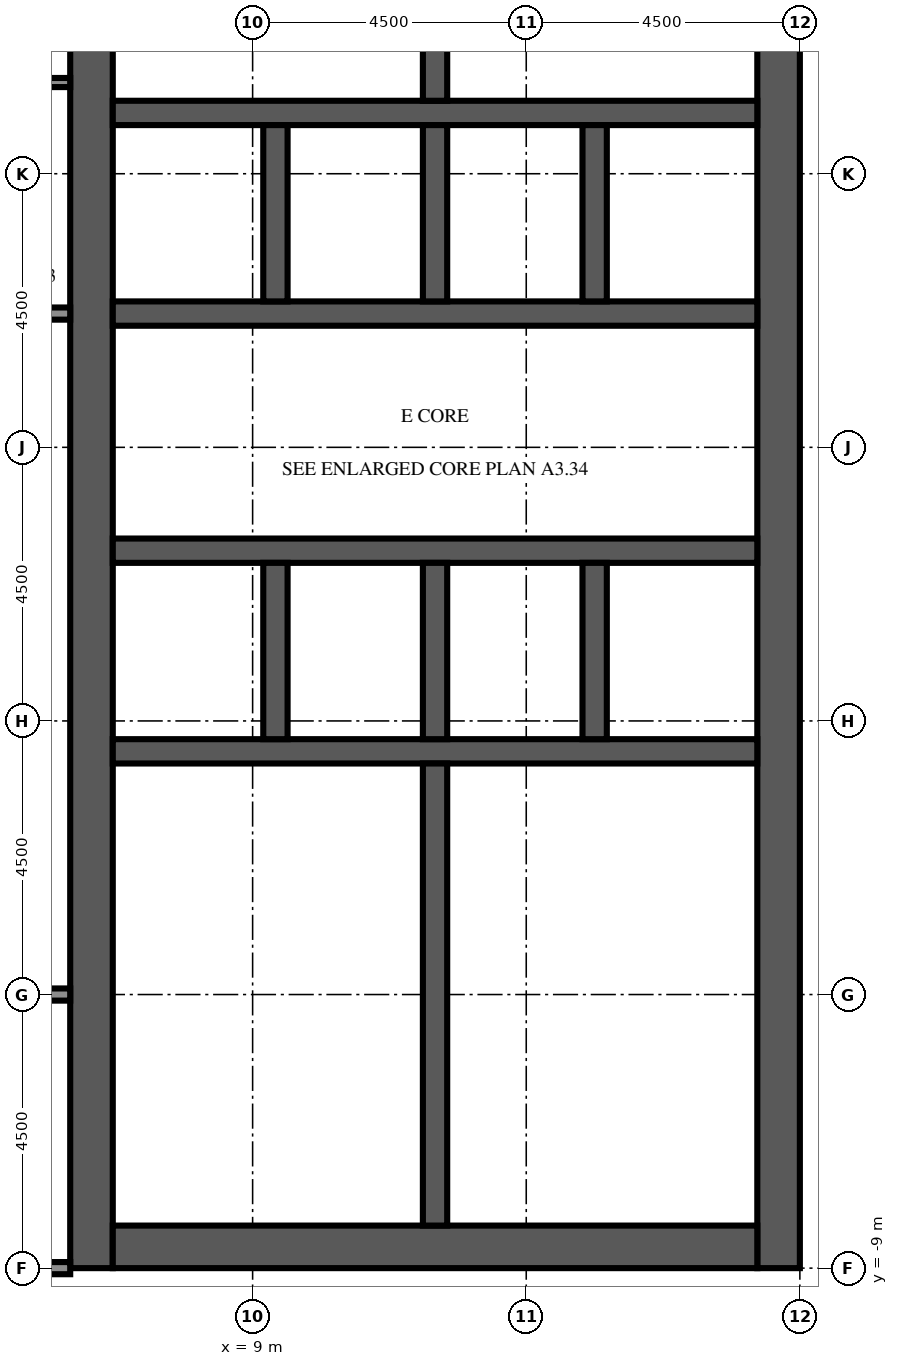
"""IFC4 building model, lengths in metres.
Left out: names, types, materials, properties, quantities, classifications, styles, units other than length and angle.
Written with IfcOpenShell. Run it as: python <this file> out.ifc"""

import sys

from ifc_helpers import new_model, si_unit, direction, frame, frame_2d, origin, place, context, subcontext, project, spatial, rectangle, extrude, element, fill, save


model = new_model("IFC4")
c1 = context("Model", 3, precision=1e-05, world=origin(), true_north=direction((0.0, 1.0)))
c2 = subcontext(c1, "Body", "Model", "MODEL_VIEW")
j1 = project(units=[si_unit("LENGTHUNIT", "METRE"), si_unit("PLANEANGLEUNIT", "RADIAN")], contexts=[c1])
p1 = place(None, origin())
s1 = spatial("IfcSite", under=j1, at=p1, CompositionType="ELEMENT")
p2 = place(p1, origin())
s2 = spatial("IfcBuilding", under=s1, at=p2, CompositionType="ELEMENT")
p3 = place(p2, frame((0.0, 0.0, 226.2)))
s3 = spatial("IfcBuildingStorey", under=s2, at=p3, CompositionType="ELEMENT", Elevation=226.2)
p4 = place(p3, frame((6.35, -9.0, 0.0), z_axis=(0.0, 0.0, 1.0), x_axis=(0.0, 1.0, 0.0)))
e1 = element("IfcWall", 1, at=p4, inside=s3, PredefinedType="SHEAR", context=c2, shape_type="SweptSolid", body=[
    extrude(rectangle(XDim=27.5, YDim=0.7, at=frame_2d((13.75, 0.0))), origin(), (0.0, 0.0, 1.0), 5.4),
])
p5 = place(p4, frame((12.55, 0.0, 0.0)))
e2 = element("IfcOpeningElement", 2, at=p5, cuts=e1, PredefinedType="OPENING", context=c2, shape_type="SweptSolid", body=[
    extrude(rectangle(XDim=2.4, YDim=2.4, at=frame_2d((1.2, 1.2))), frame((0.0, 0.36, 0.0), z_axis=(0.0, -1.0, 0.0), x_axis=(1.0, 0.0, 0.0)), (0.0, 0.0, 1.0), 0.72),
])
p6 = place(p4, frame((5.46, 0.0, 0.0)))
e3 = element("IfcOpeningElement", 3, at=p6, cuts=e1, PredefinedType="OPENING", context=c2, shape_type="SweptSolid", body=[
    extrude(rectangle(XDim=0.968, YDim=2.1, at=frame_2d((0.484, 1.05))), frame((0.0, 0.36, 0.0), z_axis=(0.0, -1.0, 0.0), x_axis=(1.0, 0.0, 0.0)), (0.0, 0.0, 1.0), 0.72),
])
p7 = place(p4, frame((23.54, 0.0, 0.0)))
e4 = element("IfcOpeningElement", 4, at=p7, cuts=e1, PredefinedType="OPENING", context=c2, shape_type="SweptSolid", body=[
    extrude(rectangle(XDim=1.2, YDim=2.1, at=frame_2d((0.6, 1.05))), frame((0.0, 0.36, 0.0), z_axis=(0.0, -1.0, 0.0), x_axis=(1.0, 0.0, 0.0)), (0.0, 0.0, 1.0), 0.72),
])
p8 = place(p3, frame((17.65, -9.0, 0.0), z_axis=(0.0, 0.0, 1.0), x_axis=(0.0, 1.0, 0.0)))
e5 = element("IfcWall", 5, at=p8, inside=s3, PredefinedType="SHEAR", context=c2, shape_type="SweptSolid", body=[
    extrude(rectangle(XDim=27.5, YDim=0.7, at=frame_2d((13.75, 0.0))), origin(), (0.0, 0.0, 1.0), 5.4),
])
p9 = place(p8, frame((12.55, 0.0, 0.0)))
e6 = element("IfcOpeningElement", 6, at=p9, cuts=e5, PredefinedType="OPENING", context=c2, shape_type="SweptSolid", body=[
    extrude(rectangle(XDim=2.4, YDim=2.4, at=frame_2d((1.2, 1.2))), frame((0.0, 0.36, 0.0), z_axis=(0.0, -1.0, 0.0), x_axis=(1.0, 0.0, 0.0)), (0.0, 0.0, 1.0), 0.72),
])
p10 = place(p8, frame((6.825, 0.0, 0.0)))
e7 = element("IfcOpeningElement", 7, at=p10, cuts=e5, PredefinedType="OPENING", context=c2, shape_type="SweptSolid", body=[
    extrude(rectangle(XDim=1.2, YDim=2.1, at=frame_2d((0.6, 1.05))), frame((0.0, 0.36, 0.0), z_axis=(0.0, -1.0, 0.0), x_axis=(1.0, 0.0, 0.0)), (0.0, 0.0, 1.0), 0.72),
])
p11 = place(p8, frame((19.475, 0.0, 0.0)))
e8 = element("IfcOpeningElement", 8, at=p11, cuts=e5, PredefinedType="OPENING", context=c2, shape_type="SweptSolid", body=[
    extrude(rectangle(XDim=1.2, YDim=2.1, at=frame_2d((0.6, 1.05))), frame((0.0, 0.36, 0.0), z_axis=(0.0, -1.0, 0.0), x_axis=(1.0, 0.0, 0.0)), (0.0, 0.0, 1.0), 0.72),
])
p12 = place(p3, frame((6.7, -8.65, 0.0), z_axis=(0.0, 0.0, 1.0), x_axis=(1.0, 0.0, 0.0)))
e9 = element("IfcWall", 9, at=p12, inside=s3, PredefinedType="SHEAR", context=c2, shape_type="SweptSolid", body=[
    extrude(rectangle(XDim=10.6, YDim=0.7, at=frame_2d((5.3, 0.0))), origin(), (0.0, 0.0, 1.0), 5.4),
])
p13 = place(p3, frame((6.7, -0.5, 0.0), z_axis=(0.0, 0.0, 1.0), x_axis=(1.0, 0.0, 0.0)))
e10 = element("IfcWall", 10, at=p13, inside=s3, PredefinedType="SHEAR", context=c2, shape_type="SweptSolid", body=[
    extrude(rectangle(XDim=10.6, YDim=0.4, at=frame_2d((5.3, 0.0))), origin(), (0.0, 0.0, 1.0), 5.4),
])
p14 = place(p3, frame((6.7, 2.8, 0.0), z_axis=(0.0, 0.0, 1.0), x_axis=(1.0, 0.0, 0.0)))
e11 = element("IfcWall", 11, at=p14, inside=s3, PredefinedType="SHEAR", context=c2, shape_type="SweptSolid", body=[
    extrude(rectangle(XDim=10.6, YDim=0.4, at=frame_2d((5.3, 0.0))), origin(), (0.0, 0.0, 1.0), 5.4),
])
p15 = place(p14, frame((0.688, 0.0, 0.0)))
e12 = element("IfcOpeningElement", 12, at=p15, cuts=e11, PredefinedType="OPENING", context=c2, shape_type="SweptSolid", body=[
    extrude(rectangle(XDim=1.1, YDim=2.1, at=frame_2d((0.55, 1.05))), frame((0.0, 0.21, 0.0), z_axis=(0.0, -1.0, 0.0), x_axis=(1.0, 0.0, 0.0)), (0.0, 0.0, 1.0), 0.42),
])
p16 = place(p14, frame((3.438, 0.0, 0.0)))
e13 = element("IfcOpeningElement", 13, at=p16, cuts=e11, PredefinedType="OPENING", context=c2, shape_type="SweptSolid", body=[
    extrude(rectangle(XDim=1.1, YDim=2.1, at=frame_2d((0.55, 1.05))), frame((0.0, 0.21, 0.0), z_axis=(0.0, -1.0, 0.0), x_axis=(1.0, 0.0, 0.0)), (0.0, 0.0, 1.0), 0.42),
])
p17 = place(p14, frame((6.113, 0.0, 0.0)))
e14 = element("IfcOpeningElement", 14, at=p17, cuts=e11, PredefinedType="OPENING", context=c2, shape_type="SweptSolid", body=[
    extrude(rectangle(XDim=1.0, YDim=2.1, at=frame_2d((0.5, 1.05))), frame((0.0, 0.21, 0.0), z_axis=(0.0, -1.0, 0.0), x_axis=(1.0, 0.0, 0.0)), (0.0, 0.0, 1.0), 0.42),
])
p18 = place(p14, frame((8.863, 0.0, 0.0)))
e15 = element("IfcOpeningElement", 15, at=p18, cuts=e11, PredefinedType="OPENING", context=c2, shape_type="SweptSolid", body=[
    extrude(rectangle(XDim=1.0, YDim=2.1, at=frame_2d((0.5, 1.05))), frame((0.0, 0.21, 0.0), z_axis=(0.0, -1.0, 0.0), x_axis=(1.0, 0.0, 0.0)), (0.0, 0.0, 1.0), 0.42),
])
p19 = place(p3, frame((6.7, 6.7, 0.0), z_axis=(0.0, 0.0, 1.0), x_axis=(1.0, 0.0, 0.0)))
e16 = element("IfcWall", 16, at=p19, inside=s3, PredefinedType="SHEAR", context=c2, shape_type="SweptSolid", body=[
    extrude(rectangle(XDim=10.6, YDim=0.4, at=frame_2d((5.3, 0.0))), origin(), (0.0, 0.0, 1.0), 5.4),
])
p20 = place(p19, frame((3.438, 0.0, 0.0)))
e17 = element("IfcOpeningElement", 17, at=p20, cuts=e16, PredefinedType="OPENING", context=c2, shape_type="SweptSolid", body=[
    extrude(rectangle(XDim=1.1, YDim=2.1, at=frame_2d((0.55, 1.05))), frame((0.0, 0.21, 0.0), z_axis=(0.0, -1.0, 0.0), x_axis=(1.0, 0.0, 0.0)), (0.0, 0.0, 1.0), 0.42),
])
p21 = place(p19, frame((6.062, 0.0, 0.0)))
e18 = element("IfcOpeningElement", 18, at=p21, cuts=e16, PredefinedType="OPENING", context=c2, shape_type="SweptSolid", body=[
    extrude(rectangle(XDim=1.1, YDim=2.1, at=frame_2d((0.55, 1.05))), frame((0.0, 0.21, 0.0), z_axis=(0.0, -1.0, 0.0), x_axis=(1.0, 0.0, 0.0)), (0.0, 0.0, 1.0), 0.42),
])
p22 = place(p19, frame((8.812, 0.0, 0.0)))
e19 = element("IfcOpeningElement", 19, at=p22, cuts=e16, PredefinedType="OPENING", context=c2, shape_type="SweptSolid", body=[
    extrude(rectangle(XDim=1.1, YDim=2.1, at=frame_2d((0.55, 1.05))), frame((0.0, 0.21, 0.0), z_axis=(0.0, -1.0, 0.0), x_axis=(1.0, 0.0, 0.0)), (0.0, 0.0, 1.0), 0.42),
])
p23 = place(p19, frame((0.738, 0.0, 0.0)))
e20 = element("IfcOpeningElement", 20, at=p23, cuts=e16, PredefinedType="OPENING", context=c2, shape_type="SweptSolid", body=[
    extrude(rectangle(XDim=1.0, YDim=2.1, at=frame_2d((0.5, 1.05))), frame((0.0, 0.21, 0.0), z_axis=(0.0, -1.0, 0.0), x_axis=(1.0, 0.0, 0.0)), (0.0, 0.0, 1.0), 0.42),
])
p24 = place(p3, frame((6.7, 10.0, 0.0), z_axis=(0.0, 0.0, 1.0), x_axis=(1.0, 0.0, 0.0)))
e21 = element("IfcWall", 21, at=p24, inside=s3, PredefinedType="SHEAR", context=c2, shape_type="SweptSolid", body=[
    extrude(rectangle(XDim=10.6, YDim=0.4, at=frame_2d((5.3, 0.0))), origin(), (0.0, 0.0, 1.0), 5.4),
])
for number, where, z_axis, x_axis in (
    (22, (9.375, -0.3, 0.0), (0.0, 0.0, 1.0), (0.0, 1.0, 0.0)),
    (23, (9.375, 6.9, 0.0), (0.0, 0.0, 1.0), (0.0, 1.0, 0.0)),
    (24, (12.0, -0.3, 0.0), (0.0, 0.0, 1.0), (0.0, 1.0, 0.0)),
    (25, (12.0, 6.9, 0.0), (0.0, 0.0, 1.0), (0.0, 1.0, 0.0)),
    (26, (14.625, -0.3, 0.0), (0.0, 0.0, 1.0), (0.0, 1.0, 0.0)),
    (27, (14.625, 6.9, 0.0), (0.0, 0.0, 1.0), (0.0, 1.0, 0.0)),
):
    element("IfcWall", number, at=place(p3, frame(where, z_axis=z_axis, x_axis=x_axis)), inside=s3, PredefinedType="SHEAR", context=c2, shape_type="SweptSolid", body=[
        extrude(rectangle(XDim=2.9, YDim=0.4, at=frame_2d((1.45, 0.0))), origin(), (0.0, 0.0, 1.0), 5.4),
    ])
for number, where, z_axis, x_axis in (
    (28, (12.0, -8.3, 0.0), (0.0, 0.0, 1.0), (0.0, 1.0, 0.0)),
    (29, (12.0, 10.2, 0.0), (0.0, 0.0, 1.0), (0.0, 1.0, 0.0)),
):
    element("IfcWall", number, at=place(p3, frame(where, z_axis=z_axis, x_axis=x_axis)), inside=s3, PredefinedType="SHEAR", context=c2, shape_type="SweptSolid", body=[
        extrude(rectangle(XDim=7.6, YDim=0.4, at=frame_2d((3.8, 0.0))), origin(), (0.0, 0.0, 1.0), 5.4),
    ])
p25 = place(p3, frame((6.7, -3.74, 0.0), z_axis=(0.0, 0.0, 1.0), x_axis=(1.0, 0.0, 0.0)))
e30 = element("IfcWall", 30, at=p25, inside=s3, PredefinedType="PARTITIONING", context=c2, shape_type="SweptSolid", body=[
    extrude(rectangle(XDim=2.55, YDim=0.1, at=frame_2d((1.275, 0.0))), origin(), (0.0, 0.0, 1.0), 4.95),
])
p26 = place(p25, frame((0.775, 0.0, 0.0)))
e31 = element("IfcOpeningElement", 31, at=p26, cuts=e30, PredefinedType="OPENING", context=c2, shape_type="SweptSolid", body=[
    extrude(rectangle(XDim=1.0, YDim=2.1, at=frame_2d((0.5, 1.05))), frame((0.0, 0.06, 0.0), z_axis=(0.0, -1.0, 0.0), x_axis=(1.0, 0.0, 0.0)), (0.0, 0.0, 1.0), 0.12),
])
p27 = place(p3, frame((9.25, -3.74, 0.0), z_axis=(0.0, 0.0, 1.0), x_axis=(1.0, 0.0, 0.0)))
e32 = element("IfcWall", 32, at=p27, inside=s3, PredefinedType="PARTITIONING", context=c2, shape_type="SweptSolid", body=[
    extrude(rectangle(XDim=2.55, YDim=0.1, at=frame_2d((1.275, 0.0))), origin(), (0.0, 0.0, 1.0), 4.95),
])
p28 = place(p27, frame((0.775, 0.0, 0.0)))
e33 = element("IfcOpeningElement", 33, at=p28, cuts=e32, PredefinedType="OPENING", context=c2, shape_type="SweptSolid", body=[
    extrude(rectangle(XDim=1.0, YDim=2.1, at=frame_2d((0.5, 1.05))), frame((0.0, 0.06, 0.0), z_axis=(0.0, -1.0, 0.0), x_axis=(1.0, 0.0, 0.0)), (0.0, 0.0, 1.0), 0.12),
])
p29 = place(p3, frame((6.7, -2.372, 0.0), z_axis=(0.0, 0.0, 1.0), x_axis=(1.0, 0.0, 0.0)))
e34 = element("IfcWall", 34, at=p29, inside=s3, PredefinedType="PARTITIONING", context=c2, shape_type="SweptSolid", body=[
    extrude(rectangle(XDim=2.55, YDim=0.1, at=frame_2d((1.275, 0.0))), origin(), (0.0, 0.0, 1.0), 4.95),
])
p30 = place(p29, frame((0.775, 0.0, 0.0)))
e35 = element("IfcOpeningElement", 35, at=p30, cuts=e34, PredefinedType="OPENING", context=c2, shape_type="SweptSolid", body=[
    extrude(rectangle(XDim=1.0, YDim=2.1, at=frame_2d((0.5, 1.05))), frame((0.0, 0.06, 0.0), z_axis=(0.0, -1.0, 0.0), x_axis=(1.0, 0.0, 0.0)), (0.0, 0.0, 1.0), 0.12),
])
p31 = place(p3, frame((9.25, -2.372, 0.0), z_axis=(0.0, 0.0, 1.0), x_axis=(1.0, 0.0, 0.0)))
e36 = element("IfcWall", 36, at=p31, inside=s3, PredefinedType="PARTITIONING", context=c2, shape_type="SweptSolid", body=[
    extrude(rectangle(XDim=2.55, YDim=0.1, at=frame_2d((1.275, 0.0))), origin(), (0.0, 0.0, 1.0), 4.95),
])
p32 = place(p31, frame((0.775, 0.0, 0.0)))
e37 = element("IfcOpeningElement", 37, at=p32, cuts=e36, PredefinedType="OPENING", context=c2, shape_type="SweptSolid", body=[
    extrude(rectangle(XDim=1.0, YDim=2.1, at=frame_2d((0.5, 1.05))), frame((0.0, 0.06, 0.0), z_axis=(0.0, -1.0, 0.0), x_axis=(1.0, 0.0, 0.0)), (0.0, 0.0, 1.0), 0.12),
])
p33 = place(p3, frame((9.25, -8.3, 0.0), z_axis=(0.0, 0.0, 1.0), x_axis=(0.0, 1.0, 0.0)))
e38 = element("IfcWall", 38, at=p33, inside=s3, PredefinedType="PARTITIONING", context=c2, shape_type="SweptSolid", body=[
    extrude(rectangle(XDim=4.56, YDim=0.1, at=frame_2d((2.28, 0.0))), origin(), (0.0, 0.0, 1.0), 4.95),
])
p34 = place(p3, frame((9.25, -2.372, 0.0), z_axis=(0.0, 0.0, 1.0), x_axis=(0.0, 1.0, 0.0)))
e39 = element("IfcWall", 39, at=p34, inside=s3, PredefinedType="PARTITIONING", context=c2, shape_type="SweptSolid", body=[
    extrude(rectangle(XDim=1.672, YDim=0.1, at=frame_2d((0.836, 0.0))), origin(), (0.0, 0.0, 1.0), 4.95),
])
p35 = place(p3, frame((1.5, -9.0, 0.0), z_axis=(0.0, 0.0, 1.0), x_axis=(1.0, 0.0, 0.0)))
e40 = element("IfcWall", 40, at=p35, inside=s3, PredefinedType="PARTITIONING", context=c2, shape_type="SweptSolid", body=[
    extrude(rectangle(XDim=4.5, YDim=0.2, at=frame_2d((2.25, 0.0))), origin(), (0.0, 0.0, 1.0), 4.95),
])
p36 = place(p35, frame((2.35, 0.0, 0.0)))
e41 = element("IfcOpeningElement", 41, at=p36, cuts=e40, PredefinedType="OPENING", context=c2, shape_type="SweptSolid", body=[
    extrude(rectangle(XDim=1.0, YDim=2.1, at=frame_2d((0.5, 1.05))), frame((0.0, 0.11, 0.0), z_axis=(0.0, -1.0, 0.0), x_axis=(1.0, 0.0, 0.0)), (0.0, 0.0, 1.0), 0.22),
])
p37 = place(p3, frame((1.5, -4.5, 0.0), z_axis=(0.0, 0.0, 1.0), x_axis=(1.0, 0.0, 0.0)))
e42 = element("IfcWall", 42, at=p37, inside=s3, PredefinedType="PARTITIONING", context=c2, shape_type="SweptSolid", body=[
    extrude(rectangle(XDim=4.5, YDim=0.2, at=frame_2d((2.25, 0.0))), origin(), (0.0, 0.0, 1.0), 4.95),
])
p38 = place(p3, frame((1.5, 6.7, 0.0), z_axis=(0.0, 0.0, 1.0), x_axis=(1.0, 0.0, 0.0)))
e43 = element("IfcWall", 43, at=p38, inside=s3, PredefinedType="PARTITIONING", context=c2, shape_type="SweptSolid", body=[
    extrude(rectangle(XDim=4.5, YDim=0.2, at=frame_2d((2.25, 0.0))), origin(), (0.0, 0.0, 1.0), 4.95),
])
p39 = place(p38, frame((1.35, 0.0, 0.0)))
e44 = element("IfcOpeningElement", 44, at=p39, cuts=e43, PredefinedType="OPENING", context=c2, shape_type="SweptSolid", body=[
    extrude(rectangle(XDim=1.0, YDim=2.1, at=frame_2d((0.5, 1.05))), frame((0.0, 0.11, 0.0), z_axis=(0.0, -1.0, 0.0), x_axis=(1.0, 0.0, 0.0)), (0.0, 0.0, 1.0), 0.22),
])
p40 = place(p3, frame((1.5, 10.5, 0.0), z_axis=(0.0, 0.0, 1.0), x_axis=(1.0, 0.0, 0.0)))
e45 = element("IfcWall", 45, at=p40, inside=s3, PredefinedType="PARTITIONING", context=c2, shape_type="SweptSolid", body=[
    extrude(rectangle(XDim=4.5, YDim=0.15, at=frame_2d((2.25, 0.0))), origin(), (0.0, 0.0, 1.0), 4.95),
])
p41 = place(p40, frame((1.35, 0.0, 0.0)))
e46 = element("IfcOpeningElement", 46, at=p41, cuts=e45, PredefinedType="OPENING", context=c2, shape_type="SweptSolid", body=[
    extrude(rectangle(XDim=1.0, YDim=2.1, at=frame_2d((0.5, 1.05))), frame((0.0, 0.085, 0.0), z_axis=(0.0, -1.0, 0.0), x_axis=(1.0, 0.0, 0.0)), (0.0, 0.0, 1.0), 0.17),
])
p42 = place(p15, origin())
e47 = element("IfcDoor", 47, at=p42, inside=s3, OperationType="DOUBLE_DOOR_SLIDING", PredefinedType="DOOR", context=c2, shape_type="SweptSolid", body=[
    extrude(rectangle(XDim=1.1, YDim=2.1, at=frame_2d((0.55, 1.05))), frame((0.0, 0.025, 0.0), z_axis=(0.0, -1.0, 0.0), x_axis=(1.0, 0.0, 0.0)), (0.0, 0.0, 1.0), 0.05),
])
fill(e12, e47)
p43 = place(p16, origin())
e48 = element("IfcDoor", 48, at=p43, inside=s3, OperationType="DOUBLE_DOOR_SLIDING", PredefinedType="DOOR", context=c2, shape_type="SweptSolid", body=[
    extrude(rectangle(XDim=1.1, YDim=2.1, at=frame_2d((0.55, 1.05))), frame((0.0, 0.025, 0.0), z_axis=(0.0, -1.0, 0.0), x_axis=(1.0, 0.0, 0.0)), (0.0, 0.0, 1.0), 0.05),
])
fill(e13, e48)
p44 = place(p20, origin())
e49 = element("IfcDoor", 49, at=p44, inside=s3, OperationType="DOUBLE_DOOR_SLIDING", PredefinedType="DOOR", context=c2, shape_type="SweptSolid", body=[
    extrude(rectangle(XDim=1.1, YDim=2.1, at=frame_2d((0.55, 1.05))), frame((0.0, 0.025, 0.0), z_axis=(0.0, -1.0, 0.0), x_axis=(1.0, 0.0, 0.0)), (0.0, 0.0, 1.0), 0.05),
])
fill(e17, e49)
p45 = place(p21, origin())
e50 = element("IfcDoor", 50, at=p45, inside=s3, OperationType="DOUBLE_DOOR_SLIDING", PredefinedType="DOOR", context=c2, shape_type="SweptSolid", body=[
    extrude(rectangle(XDim=1.1, YDim=2.1, at=frame_2d((0.55, 1.05))), frame((0.0, 0.025, 0.0), z_axis=(0.0, -1.0, 0.0), x_axis=(1.0, 0.0, 0.0)), (0.0, 0.0, 1.0), 0.05),
])
fill(e18, e50)
p46 = place(p22, origin())
e51 = element("IfcDoor", 51, at=p46, inside=s3, OperationType="DOUBLE_DOOR_SLIDING", PredefinedType="DOOR", context=c2, shape_type="SweptSolid", body=[
    extrude(rectangle(XDim=1.1, YDim=2.1, at=frame_2d((0.55, 1.05))), frame((0.0, 0.025, 0.0), z_axis=(0.0, -1.0, 0.0), x_axis=(1.0, 0.0, 0.0)), (0.0, 0.0, 1.0), 0.05),
])
fill(e19, e51)
p47 = place(p5, origin())
e52 = element("IfcDoor", 52, at=p47, inside=s3, OperationType="DOUBLE_DOOR_DOUBLE_SWING", PredefinedType="DOOR", context=c2, shape_type="SweptSolid", body=[
    extrude(rectangle(XDim=2.4, YDim=2.4, at=frame_2d((1.2, 1.2))), frame((0.0, 0.025, 0.0), z_axis=(0.0, -1.0, 0.0), x_axis=(1.0, 0.0, 0.0)), (0.0, 0.0, 1.0), 0.05),
])
fill(e2, e52)
p48 = place(p9, origin())
e53 = element("IfcDoor", 53, at=p48, inside=s3, OperationType="DOUBLE_DOOR_DOUBLE_SWING", PredefinedType="DOOR", context=c2, shape_type="SweptSolid", body=[
    extrude(rectangle(XDim=2.4, YDim=2.4, at=frame_2d((1.2, 1.2))), frame((0.0, 0.025, 0.0), z_axis=(0.0, -1.0, 0.0), x_axis=(1.0, 0.0, 0.0)), (0.0, 0.0, 1.0), 0.05),
])
fill(e6, e53)
p49 = place(p10, frame((1.2, 0.0, 0.0), z_axis=(0.0, 0.0, 1.0), x_axis=(-1.0, 0.0, 0.0)))
e54 = element("IfcDoor", 54, at=p49, inside=s3, OperationType="SINGLE_SWING_LEFT", PredefinedType="DOOR", context=c2, shape_type="SweptSolid", body=[
    extrude(rectangle(XDim=1.2, YDim=2.1, at=frame_2d((0.6, 1.05))), frame((0.0, 0.025, 0.0), z_axis=(0.0, -1.0, 0.0), x_axis=(1.0, 0.0, 0.0)), (0.0, 0.0, 1.0), 0.05),
])
fill(e7, e54)
p50 = place(p11, frame((1.2, 0.0, 0.0), z_axis=(0.0, 0.0, 1.0), x_axis=(-1.0, 0.0, 0.0)))
e55 = element("IfcDoor", 55, at=p50, inside=s3, OperationType="SINGLE_SWING_LEFT", PredefinedType="DOOR", context=c2, shape_type="SweptSolid", body=[
    extrude(rectangle(XDim=1.2, YDim=2.1, at=frame_2d((0.6, 1.05))), frame((0.0, 0.025, 0.0), z_axis=(0.0, -1.0, 0.0), x_axis=(1.0, 0.0, 0.0)), (0.0, 0.0, 1.0), 0.05),
])
fill(e8, e55)
p51 = place(p17, origin())
e56 = element("IfcDoor", 56, at=p51, inside=s3, OperationType="SINGLE_SWING_LEFT", PredefinedType="DOOR", context=c2, shape_type="SweptSolid", body=[
    extrude(rectangle(XDim=1.0, YDim=2.1, at=frame_2d((0.5, 1.05))), frame((0.0, 0.025, 0.0), z_axis=(0.0, -1.0, 0.0), x_axis=(1.0, 0.0, 0.0)), (0.0, 0.0, 1.0), 0.05),
])
fill(e14, e56)
p52 = place(p18, origin())
e57 = element("IfcDoor", 57, at=p52, inside=s3, OperationType="SINGLE_SWING_RIGHT", PredefinedType="DOOR", context=c2, shape_type="SweptSolid", body=[
    extrude(rectangle(XDim=1.0, YDim=2.1, at=frame_2d((0.5, 1.05))), frame((0.0, 0.025, 0.0), z_axis=(0.0, -1.0, 0.0), x_axis=(1.0, 0.0, 0.0)), (0.0, 0.0, 1.0), 0.05),
])
fill(e15, e57)
p53 = place(p23, origin())
e58 = element("IfcDoor", 58, at=p53, inside=s3, OperationType="SINGLE_SWING_LEFT", PredefinedType="DOOR", context=c2, shape_type="SweptSolid", body=[
    extrude(rectangle(XDim=1.0, YDim=2.1, at=frame_2d((0.5, 1.05))), frame((0.0, 0.025, 0.0), z_axis=(0.0, -1.0, 0.0), x_axis=(1.0, 0.0, 0.0)), (0.0, 0.0, 1.0), 0.05),
])
fill(e20, e58)
p54 = place(p6, origin())
e59 = element("IfcDoor", 59, at=p54, inside=s3, OperationType="SINGLE_SWING_RIGHT", PredefinedType="DOOR", context=c2, shape_type="SweptSolid", body=[
    extrude(rectangle(XDim=0.968, YDim=2.1, at=frame_2d((0.484, 1.05))), frame((0.0, -0.275, 0.0), z_axis=(0.0, -1.0, 0.0), x_axis=(1.0, 0.0, 0.0)), (0.0, 0.0, 1.0), 0.05),
])
fill(e3, e59)
p55 = place(p26, origin())
e60 = element("IfcDoor", 60, at=p55, inside=s3, OperationType="SINGLE_SWING_LEFT", PredefinedType="DOOR", context=c2, shape_type="SweptSolid", body=[
    extrude(rectangle(XDim=1.0, YDim=2.1, at=frame_2d((0.5, 1.05))), frame((0.0, 0.025, 0.0), z_axis=(0.0, -1.0, 0.0), x_axis=(1.0, 0.0, 0.0)), (0.0, 0.0, 1.0), 0.05),
])
fill(e31, e60)
p56 = place(p28, origin())
e61 = element("IfcDoor", 61, at=p56, inside=s3, OperationType="SINGLE_SWING_RIGHT", PredefinedType="DOOR", context=c2, shape_type="SweptSolid", body=[
    extrude(rectangle(XDim=1.0, YDim=2.1, at=frame_2d((0.5, 1.05))), frame((0.0, 0.025, 0.0), z_axis=(0.0, -1.0, 0.0), x_axis=(1.0, 0.0, 0.0)), (0.0, 0.0, 1.0), 0.05),
])
fill(e33, e61)
p57 = place(p30, origin())
e62 = element("IfcDoor", 62, at=p57, inside=s3, OperationType="SINGLE_SWING_LEFT", PredefinedType="DOOR", context=c2, shape_type="SweptSolid", body=[
    extrude(rectangle(XDim=1.0, YDim=2.1, at=frame_2d((0.5, 1.05))), frame((0.0, 0.025, 0.0), z_axis=(0.0, -1.0, 0.0), x_axis=(1.0, 0.0, 0.0)), (0.0, 0.0, 1.0), 0.05),
])
fill(e35, e62)
p58 = place(p32, origin())
e63 = element("IfcDoor", 63, at=p58, inside=s3, OperationType="SINGLE_SWING_RIGHT", PredefinedType="DOOR", context=c2, shape_type="SweptSolid", body=[
    extrude(rectangle(XDim=1.0, YDim=2.1, at=frame_2d((0.5, 1.05))), frame((0.0, 0.025, 0.0), z_axis=(0.0, -1.0, 0.0), x_axis=(1.0, 0.0, 0.0)), (0.0, 0.0, 1.0), 0.05),
])
fill(e37, e63)
save(model, sys.argv[1])
